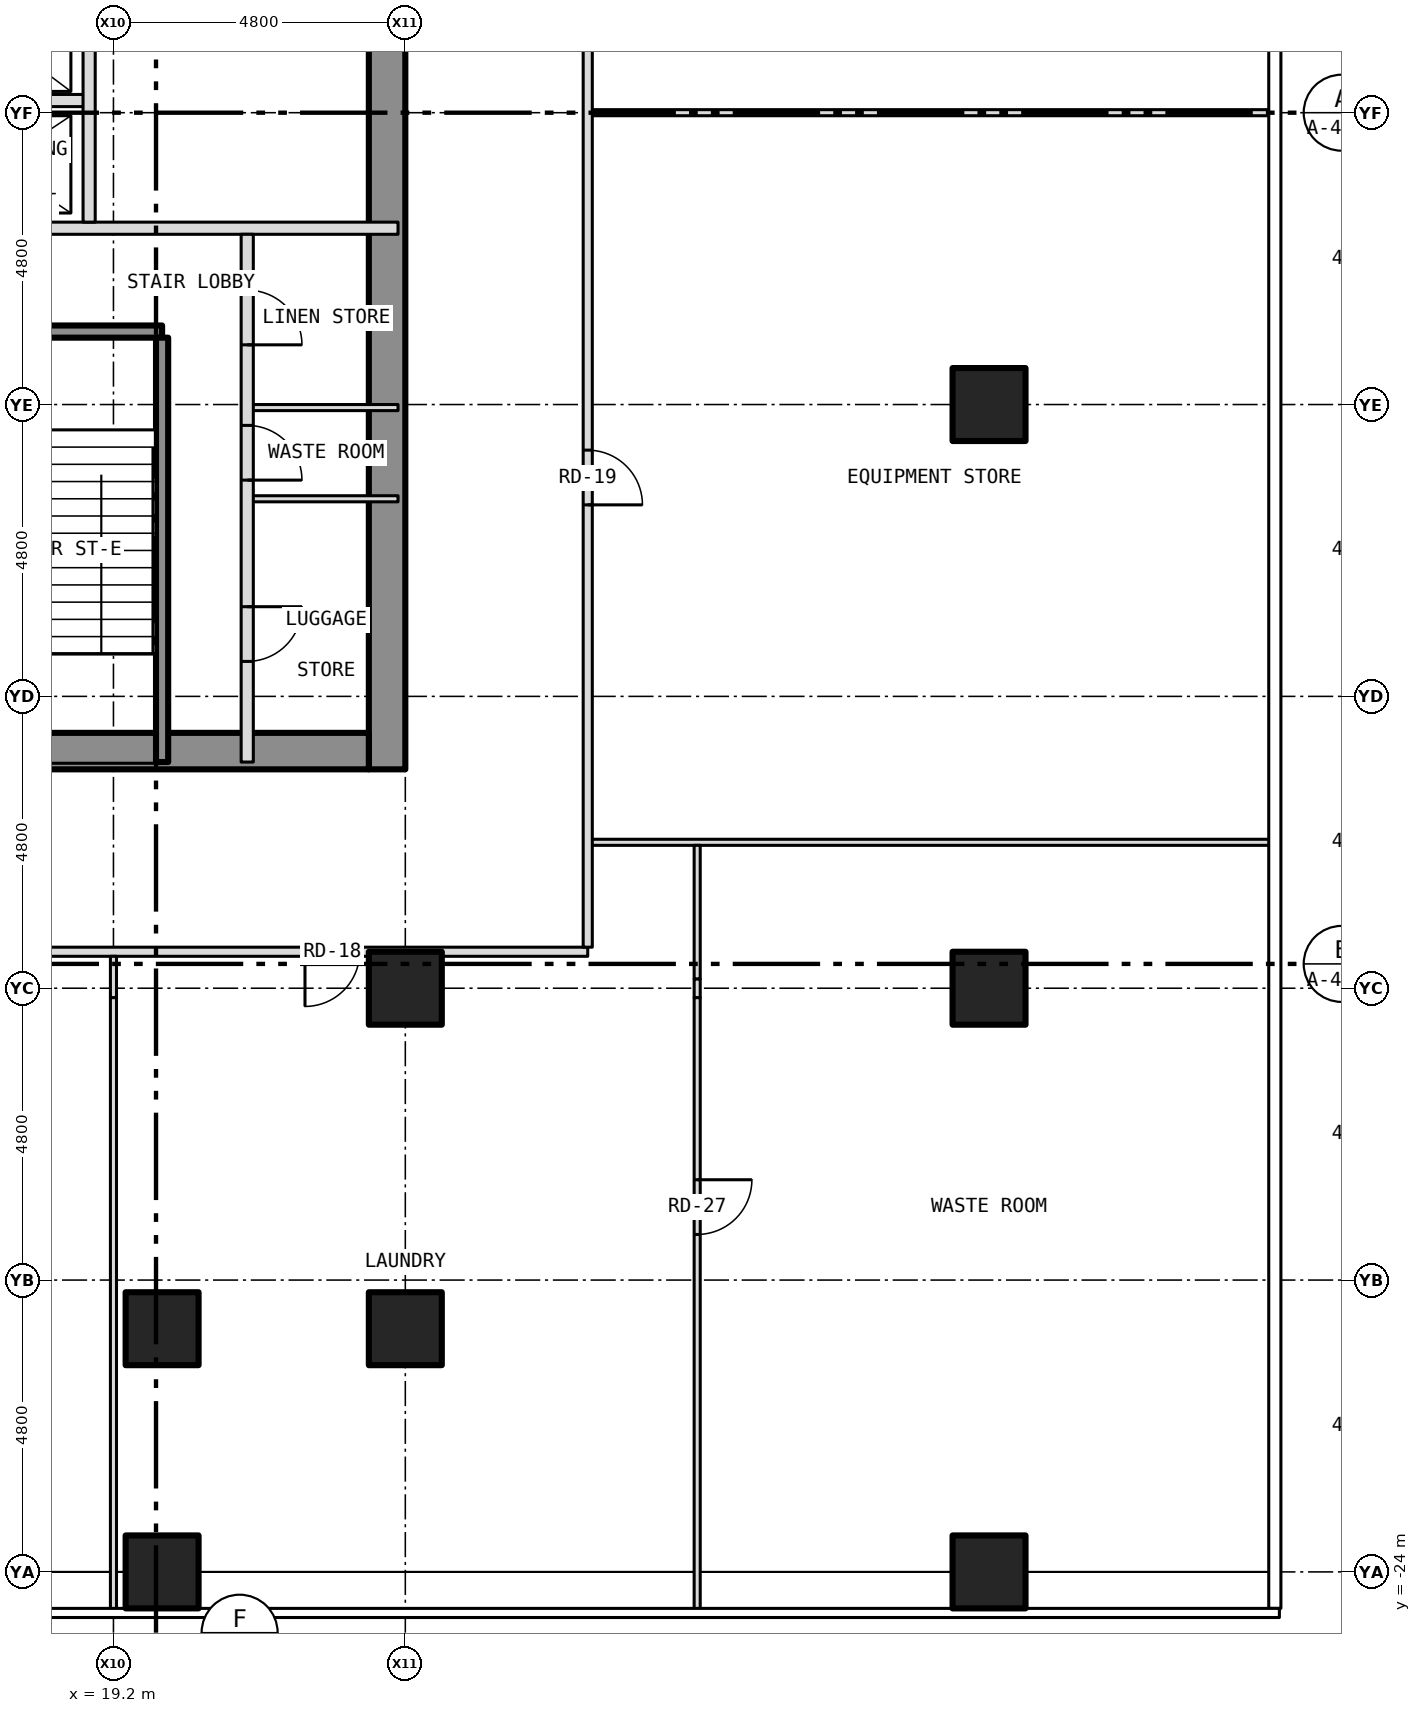
"""IFC4 building model, lengths in metres.
Left out: names, types, materials, properties, quantities, classifications, styles, units other than length and angle.
Written with IfcOpenShell. Run it as: python <this file> out.ifc"""

import sys

from ifc_helpers import new_model, si_unit, direction, frame, frame_2d, origin, origin_2d, place, context, subcontext, project, spatial, rectangle, hollow_rectangle, extrude, element, fill, save


model = new_model("IFC4")
c1 = context("Model", 3, precision=1e-05, world=origin(), true_north=direction((0.0, 1.0)))
c2 = subcontext(c1, "Body", "Model", "MODEL_VIEW")
j1 = project(units=[si_unit("LENGTHUNIT", "METRE"), si_unit("PLANEANGLEUNIT", "RADIAN")], contexts=[c1])
p1 = place(None, origin())
s1 = spatial("IfcSite", under=j1, at=p1, CompositionType="ELEMENT")
p2 = place(p1, origin())
s2 = spatial("IfcBuilding", under=s1, at=p2, CompositionType="ELEMENT")
p3 = place(p2, frame((0.0, 0.0, 24.5)))
s3 = spatial("IfcBuildingStorey", under=s2, at=p3, CompositionType="ELEMENT", Elevation=24.5)
for number, where, z_axis, x_axis in (
    (1, (20.0, -24.0, -0.2), (0.0, 0.0, 1.0), (1.0, 0.0, 0.0)),
    (2, (33.6, -24.0, -0.2), (0.0, 0.0, 1.0), (1.0, 0.0, 0.0)),
    (3, (33.6, -14.4, -0.2), (0.0, 0.0, 1.0), (1.0, 0.0, 0.0)),
    (4, (33.6, -4.8, -0.2), (0.0, 0.0, 1.0), (1.0, 0.0, 0.0)),
    (5, (20.0, -20.0, -0.2), (0.0, 0.0, 1.0), (1.0, 0.0, 0.0)),
    (6, (24.0, -20.0, -0.2), (0.0, 0.0, 1.0), (1.0, 0.0, 0.0)),
    (7, (24.0, -14.4, -0.2), (0.0, 0.0, 1.0), (1.0, 0.0, 0.0)),
):
    element("IfcColumn", number, at=place(p3, frame(where, z_axis=z_axis, x_axis=x_axis)), inside=s3, PredefinedType="COLUMN", context=c2, shape_type="SweptSolid", body=[
        extrude(hollow_rectangle(XDim=1.2, YDim=1.2, WallThickness=0.07, at=origin_2d()), origin(), (0.0, 0.0, 1.0), 4.5),
    ])
p4 = place(p3, frame((23.7, -10.8, 0.0), z_axis=(0.0, 0.0, 1.0), x_axis=(0.0, 1.0, 0.0)))
e8 = element("IfcWall", 8, at=p4, inside=s3, PredefinedType="SHEAR", context=c2, shape_type="SweptSolid", body=[
    extrude(rectangle(XDim=21.6, YDim=0.6, at=frame_2d((10.8, 0.0))), origin(), (0.0, 0.0, 1.0), 4.2),
])
p5 = place(p3, frame((16.4, -10.5, 0.0), z_axis=(0.0, 0.0, 1.0), x_axis=(1.0, 0.0, 0.0)))
e9 = element("IfcWall", 9, at=p5, inside=s3, PredefinedType="SHEAR", context=c2, shape_type="SweptSolid", body=[
    extrude(rectangle(XDim=7.0, YDim=0.6, at=frame_2d((3.5, 0.0))), origin(), (0.0, 0.0, 1.0), 4.2),
])
p6 = place(p3, frame((-27.0, -13.8, 0.0), z_axis=(0.0, 0.0, 1.0), x_axis=(1.0, 0.0, 0.0)))
e10 = element("IfcWall", 10, at=p6, inside=s3, PredefinedType="PARTITIONING", context=c2, shape_type="SweptSolid", body=[
    extrude(rectangle(XDim=54.0, YDim=0.15, at=frame_2d((27.0, 0.0))), origin(), (0.0, 0.0, 1.0), 4.3),
])
p7 = place(p6, frame((37.83, 0.0, 0.0)))
e11 = element("IfcOpeningElement", 11, at=p7, cuts=e10, PredefinedType="OPENING", context=c2, shape_type="SweptSolid", body=[
    extrude(rectangle(XDim=0.9, YDim=2.1, at=frame_2d((0.45, 1.05))), frame((0.0, 0.087, 0.0), z_axis=(0.0, -1.0, 0.0), x_axis=(1.0, 0.0, 0.0)), (0.0, 0.0, 1.0), 0.174),
])
p8 = place(p6, frame((39.88, 0.0, 0.0)))
e12 = element("IfcOpeningElement", 12, at=p8, cuts=e10, PredefinedType="OPENING", context=c2, shape_type="SweptSolid", body=[
    extrude(rectangle(XDim=0.9, YDim=2.1, at=frame_2d((0.45, 1.05))), frame((0.0, 0.087, 0.0), z_axis=(0.0, -1.0, 0.0), x_axis=(1.0, 0.0, 0.0)), (0.0, 0.0, 1.0), 0.174),
])
p9 = place(p6, frame((43.75, 0.0, 0.0)))
e13 = element("IfcOpeningElement", 13, at=p9, cuts=e10, PredefinedType="OPENING", context=c2, shape_type="SweptSolid", body=[
    extrude(rectangle(XDim=0.9, YDim=2.1, at=frame_2d((0.45, 1.05))), frame((0.0, 0.087, 0.0), z_axis=(0.0, -1.0, 0.0), x_axis=(1.0, 0.0, 0.0)), (0.0, 0.0, 1.0), 0.174),
])
p10 = place(p6, frame((10.972, 0.0, 0.0)))
e14 = element("IfcOpeningElement", 14, at=p10, cuts=e10, PredefinedType="OPENING", context=c2, shape_type="SweptSolid", body=[
    extrude(rectangle(XDim=0.9, YDim=2.1, at=frame_2d((0.45, 1.05))), frame((0.0, 0.087, 0.0), z_axis=(0.0, -1.0, 0.0), x_axis=(1.0, 0.0, 0.0)), (0.0, 0.0, 1.0), 0.174),
])
p11 = place(p6, frame((18.523, 0.0, 0.0)))
e15 = element("IfcOpeningElement", 15, at=p11, cuts=e10, PredefinedType="OPENING", context=c2, shape_type="SweptSolid", body=[
    extrude(rectangle(XDim=0.9, YDim=2.1, at=frame_2d((0.45, 1.05))), frame((0.0, 0.087, 0.0), z_axis=(0.0, -1.0, 0.0), x_axis=(1.0, 0.0, 0.0)), (0.0, 0.0, 1.0), 0.174),
])
p12 = place(p6, frame((22.956, 0.0, 0.0)))
e16 = element("IfcOpeningElement", 16, at=p12, cuts=e10, PredefinedType="OPENING", context=c2, shape_type="SweptSolid", body=[
    extrude(rectangle(XDim=0.9, YDim=2.1, at=frame_2d((0.45, 1.05))), frame((0.0, 0.087, 0.0), z_axis=(0.0, -1.0, 0.0), x_axis=(1.0, 0.0, 0.0)), (0.0, 0.0, 1.0), 0.174),
])
p13 = place(p6, frame((25.242, 0.0, 0.0)))
e17 = element("IfcOpeningElement", 17, at=p13, cuts=e10, PredefinedType="OPENING", context=c2, shape_type="SweptSolid", body=[
    extrude(rectangle(XDim=0.9, YDim=2.1, at=frame_2d((0.45, 1.05))), frame((0.0, 0.087, 0.0), z_axis=(0.0, -1.0, 0.0), x_axis=(1.0, 0.0, 0.0)), (0.0, 0.0, 1.0), 0.174),
])
p14 = place(p6, frame((29.45, 0.0, 0.0)))
e18 = element("IfcOpeningElement", 18, at=p14, cuts=e10, PredefinedType="OPENING", context=c2, shape_type="SweptSolid", body=[
    extrude(rectangle(XDim=0.9, YDim=2.1, at=frame_2d((0.45, 1.05))), frame((0.0, 0.087, 0.0), z_axis=(0.0, -1.0, 0.0), x_axis=(1.0, 0.0, 0.0)), (0.0, 0.0, 1.0), 0.174),
])
p15 = place(p6, frame((3.75, 0.0, 0.0)))
e19 = element("IfcOpeningElement", 19, at=p15, cuts=e10, PredefinedType="OPENING", context=c2, shape_type="SweptSolid", body=[
    extrude(rectangle(XDim=0.9, YDim=2.1, at=frame_2d((0.45, 1.05))), frame((0.0, 0.087, 0.0), z_axis=(0.0, -1.0, 0.0), x_axis=(1.0, 0.0, 0.0)), (0.0, 0.0, 1.0), 0.174),
])
p16 = place(p6, frame((49.35, 0.0, 0.0)))
e20 = element("IfcOpeningElement", 20, at=p16, cuts=e10, PredefinedType="OPENING", context=c2, shape_type="SweptSolid", body=[
    extrude(rectangle(XDim=0.9, YDim=2.1, at=frame_2d((0.45, 1.05))), frame((0.0, 0.087, 0.0), z_axis=(0.0, -1.0, 0.0), x_axis=(1.0, 0.0, 0.0)), (0.0, 0.0, 1.0), 0.174),
])
p17 = place(p6, frame((34.25, 0.0, 0.0)))
e21 = element("IfcOpeningElement", 21, at=p17, cuts=e10, PredefinedType="OPENING", context=c2, shape_type="SweptSolid", body=[
    extrude(rectangle(XDim=0.9, YDim=2.1, at=frame_2d((0.45, 1.05))), frame((0.0, 0.087, 0.0), z_axis=(0.0, -1.0, 0.0), x_axis=(1.0, 0.0, 0.0)), (0.0, 0.0, 1.0), 0.174),
])
p18 = place(p3, frame((27.0, -12.0, 0.0), z_axis=(0.0, 0.0, 1.0), x_axis=(1.0, 0.0, 0.0)))
e22 = element("IfcWall", 22, at=p18, inside=s3, PredefinedType="PARTITIONING", context=c2, shape_type="SweptSolid", body=[
    extrude(rectangle(XDim=11.28, YDim=0.1, at=frame_2d((5.64, 0.0))), origin(), (0.0, 0.0, 1.0), 4.3),
])
for number, where, z_axis, x_axis in (
    (23, (21.4, -6.35, 0.0), (0.0, 0.0, 1.0), (1.0, 0.0, 0.0)),
    (24, (21.4, -4.85, 0.0), (0.0, 0.0, 1.0), (1.0, 0.0, 0.0)),
):
    element("IfcWall", number, at=place(p3, frame(where, z_axis=z_axis, x_axis=x_axis)), inside=s3, PredefinedType="PARTITIONING", context=c2, shape_type="SweptSolid", body=[
        extrude(rectangle(XDim=2.48, YDim=0.1, at=frame_2d((1.24, 0.0))), origin(), (0.0, 0.0, 1.0), 4.2),
    ])
p19 = place(p3, frame((15.92, -3.6, 0.0), z_axis=(0.0, 0.0, 1.0), x_axis=(1.0, 0.0, 0.0)))
e25 = element("IfcWall", 25, at=p19, inside=s3, PredefinedType="SHEAR", context=c2, shape_type="SweptSolid", body=[
    extrude(rectangle(XDim=4.08, YDim=0.2, at=frame_2d((2.04, 0.0))), origin(), (0.0, 0.0, 1.0), 4.2),
])
p20 = place(p3, frame((15.92, -1.9, 0.0), z_axis=(0.0, 0.0, 1.0), x_axis=(1.0, 0.0, 0.0)))
e26 = element("IfcWall", 26, at=p20, inside=s3, PredefinedType="PARTITIONING", context=c2, shape_type="SweptSolid", body=[
    extrude(rectangle(XDim=7.96, YDim=0.2, at=frame_2d((3.98, 0.0))), origin(), (0.0, 0.0, 1.0), 4.2),
])
p21 = place(p3, frame((27.0, 0.0, 0.0), z_axis=(0.0, 0.0, 1.0), x_axis=(1.0, 0.0, 0.0)))
e27 = element("IfcWall", 27, at=p21, inside=s3, PredefinedType="PARTITIONING", context=c2, shape_type="SweptSolid", body=[
    extrude(rectangle(XDim=11.28, YDim=0.1, at=frame_2d((5.64, 0.0))), origin(), (0.0, 0.0, 1.0), 4.3),
])
p22 = place(p3, frame((15.92, 0.2, 0.0), z_axis=(0.0, 0.0, 1.0), x_axis=(1.0, 0.0, 0.0)))
e28 = element("IfcWall", 28, at=p22, inside=s3, PredefinedType="PARTITIONING", context=c2, shape_type="SweptSolid", body=[
    extrude(rectangle(XDim=2.88, YDim=0.2, at=frame_2d((1.44, 0.0))), origin(), (0.0, 0.0, 1.0), 4.2),
])
p23 = place(p3, frame((18.8, -1.8, 0.0), z_axis=(0.0, 0.0, 1.0), x_axis=(0.0, 1.0, 0.0)))
e29 = element("IfcWall", 29, at=p23, inside=s3, PredefinedType="PARTITIONING", context=c2, shape_type="SweptSolid", body=[
    extrude(rectangle(XDim=12.48, YDim=0.2, at=frame_2d((6.24, 0.0))), origin(), (0.0, 0.0, 1.0), 4.2),
])
p24 = place(p3, frame((19.2, -24.63, 0.0), z_axis=(0.0, 0.0, 1.0), x_axis=(0.0, 1.0, 0.0)))
e30 = element("IfcWall", 30, at=p24, inside=s3, PredefinedType="PARTITIONING", context=c2, shape_type="SweptSolid", body=[
    extrude(rectangle(XDim=10.076, YDim=0.1, at=frame_2d((5.038, 0.0))), origin(), (0.0, 0.0, 1.0), 3.683),
])
p25 = place(p3, frame((19.2, -14.554, 0.0), z_axis=(0.0, 0.0, 1.0), x_axis=(0.0, 1.0, 0.0)))
e31 = element("IfcWall", 31, at=p25, inside=s3, PredefinedType="PARTITIONING", context=c2, shape_type="SweptSolid", body=[
    extrude(rectangle(XDim=0.679, YDim=0.1, at=frame_2d((0.339, 0.0))), origin(), (0.0, 0.0, 1.0), 4.3),
])
p26 = place(p3, frame((20.0, -10.68, 0.0), z_axis=(0.0, 0.0, 1.0), x_axis=(0.0, 1.0, 0.0)))
e32 = element("IfcWall", 32, at=p26, inside=s3, PredefinedType="SHEAR", context=c2, shape_type="SweptSolid", body=[
    extrude(rectangle(XDim=6.98, YDim=0.2, at=frame_2d((3.49, 0.0))), origin(), (0.0, 0.0, 1.0), 4.2),
])
p27 = place(p3, frame((21.4, -10.68, 0.0), z_axis=(0.0, 0.0, 1.0), x_axis=(0.0, 1.0, 0.0)))
e33 = element("IfcWall", 33, at=p27, inside=s3, PredefinedType="PARTITIONING", context=c2, shape_type="SweptSolid", body=[
    extrude(rectangle(XDim=8.68, YDim=0.2, at=frame_2d((4.34, 0.0))), origin(), (0.0, 0.0, 1.0), 4.2),
])
p28 = place(p27, frame((1.655, 0.0, 0.0)))
e34 = element("IfcOpeningElement", 34, at=p28, cuts=e33, PredefinedType="OPENING", context=c2, shape_type="SweptSolid", body=[
    extrude(rectangle(XDim=0.9, YDim=2.1, at=frame_2d((0.45, 1.05))), frame((0.0, 0.112, 0.0), z_axis=(0.0, -1.0, 0.0), x_axis=(1.0, 0.0, 0.0)), (0.0, 0.0, 1.0), 0.224),
])
p29 = place(p27, frame((4.637, 0.0, 0.0)))
e35 = element("IfcOpeningElement", 35, at=p29, cuts=e33, PredefinedType="OPENING", context=c2, shape_type="SweptSolid", body=[
    extrude(rectangle(XDim=0.9, YDim=2.1, at=frame_2d((0.45, 1.05))), frame((0.0, 0.112, 0.0), z_axis=(0.0, -1.0, 0.0), x_axis=(1.0, 0.0, 0.0)), (0.0, 0.0, 1.0), 0.224),
])
p30 = place(p27, frame((6.862, 0.0, 0.0)))
e36 = element("IfcOpeningElement", 36, at=p30, cuts=e33, PredefinedType="OPENING", context=c2, shape_type="SweptSolid", body=[
    extrude(rectangle(XDim=0.9, YDim=2.1, at=frame_2d((0.45, 1.05))), frame((0.0, 0.112, 0.0), z_axis=(0.0, -1.0, 0.0), x_axis=(1.0, 0.0, 0.0)), (0.0, 0.0, 1.0), 0.224),
])
p31 = place(p3, frame((27.0, -13.725, 0.0), z_axis=(0.0, 0.0, 1.0), x_axis=(0.0, 1.0, 0.0)))
e37 = element("IfcWall", 37, at=p31, inside=s3, PredefinedType="PARTITIONING", context=c2, shape_type="SweptSolid", body=[
    extrude(rectangle(XDim=27.45, YDim=0.15, at=frame_2d((13.725, 0.0))), origin(), (0.0, 0.0, 1.0), 4.3),
])
p32 = place(p31, frame((7.275, 0.0, 0.0)))
e38 = element("IfcOpeningElement", 38, at=p32, cuts=e37, PredefinedType="OPENING", context=c2, shape_type="SweptSolid", body=[
    extrude(rectangle(XDim=0.9, YDim=2.1, at=frame_2d((0.45, 1.05))), frame((0.0, 0.087, 0.0), z_axis=(0.0, -1.0, 0.0), x_axis=(1.0, 0.0, 0.0)), (0.0, 0.0, 1.0), 0.174),
])
p33 = place(p31, frame((19.275, 0.0, 0.0)))
e39 = element("IfcOpeningElement", 39, at=p33, cuts=e37, PredefinedType="OPENING", context=c2, shape_type="SweptSolid", body=[
    extrude(rectangle(XDim=0.9, YDim=2.1, at=frame_2d((0.45, 1.05))), frame((0.0, 0.087, 0.0), z_axis=(0.0, -1.0, 0.0), x_axis=(1.0, 0.0, 0.0)), (0.0, 0.0, 1.0), 0.174),
])
p34 = place(p3, frame((28.8, -24.63, 0.0), z_axis=(0.0, 0.0, 1.0), x_axis=(0.0, 1.0, 0.0)))
e40 = element("IfcWall", 40, at=p34, inside=s3, PredefinedType="PARTITIONING", context=c2, shape_type="SweptSolid", body=[
    extrude(rectangle(XDim=10.076, YDim=0.1, at=frame_2d((5.038, 0.0))), origin(), (0.0, 0.0, 1.0), 3.683),
])
p35 = place(p34, frame((6.18, 0.0, 0.0)))
e41 = element("IfcOpeningElement", 41, at=p35, cuts=e40, PredefinedType="OPENING", context=c2, shape_type="SweptSolid", body=[
    extrude(rectangle(XDim=0.9, YDim=2.1, at=frame_2d((0.45, 1.05))), frame((0.0, 0.062, 0.0), z_axis=(0.0, -1.0, 0.0), x_axis=(1.0, 0.0, 0.0)), (0.0, 0.0, 1.0), 0.124),
])
p36 = place(p3, frame((28.8, -14.554, 0.0), z_axis=(0.0, 0.0, 1.0), x_axis=(0.0, 1.0, 0.0)))
e42 = element("IfcWall", 42, at=p36, inside=s3, PredefinedType="PARTITIONING", context=c2, shape_type="SweptSolid", body=[
    extrude(rectangle(XDim=0.308, YDim=0.1, at=frame_2d((0.154, 0.0))), origin(), (0.0, 0.0, 1.0), 4.3),
])
p37 = place(p3, frame((28.8, -14.246, 0.0), z_axis=(0.0, 0.0, 1.0), x_axis=(0.0, 1.0, 0.0)))
e43 = element("IfcWall", 43, at=p37, inside=s3, PredefinedType="PARTITIONING", context=c2, shape_type="SweptSolid", body=[
    extrude(rectangle(XDim=2.196, YDim=0.1, at=frame_2d((1.098, 0.0))), origin(), (0.0, 0.0, 1.0), 3.683),
])
p38 = place(p28, origin())
e44 = element("IfcDoor", 44, at=p38, inside=s3, OperationType="SINGLE_SWING_RIGHT", PredefinedType="DOOR", context=c2, shape_type="SweptSolid", body=[
    extrude(rectangle(XDim=0.9, YDim=2.1, at=frame_2d((0.45, 1.05))), frame((0.0, 0.025, 0.0), z_axis=(0.0, -1.0, 0.0), x_axis=(1.0, 0.0, 0.0)), (0.0, 0.0, 1.0), 0.05),
])
fill(e34, e44)
p39 = place(p29, origin())
e45 = element("IfcDoor", 45, at=p39, inside=s3, OperationType="SINGLE_SWING_LEFT", PredefinedType="DOOR", context=c2, shape_type="SweptSolid", body=[
    extrude(rectangle(XDim=0.9, YDim=2.1, at=frame_2d((0.45, 1.05))), frame((0.0, 0.025, 0.0), z_axis=(0.0, -1.0, 0.0), x_axis=(1.0, 0.0, 0.0)), (0.0, 0.0, 1.0), 0.05),
])
fill(e35, e45)
p40 = place(p30, origin())
e46 = element("IfcDoor", 46, at=p40, inside=s3, OperationType="SINGLE_SWING_LEFT", PredefinedType="DOOR", context=c2, shape_type="SweptSolid", body=[
    extrude(rectangle(XDim=0.9, YDim=2.1, at=frame_2d((0.45, 1.05))), frame((0.0, 0.025, 0.0), z_axis=(0.0, -1.0, 0.0), x_axis=(1.0, 0.0, 0.0)), (0.0, 0.0, 1.0), 0.05),
])
fill(e36, e46)
p41 = place(p16, origin())
e47 = element("IfcDoor", 47, at=p41, inside=s3, OperationType="SINGLE_SWING_LEFT", PredefinedType="DOOR", context=c2, shape_type="SweptSolid", body=[
    extrude(rectangle(XDim=0.9, YDim=2.1, at=frame_2d((0.45, 1.05))), frame((0.0, 0.025, 0.0), z_axis=(0.0, -1.0, 0.0), x_axis=(1.0, 0.0, 0.0)), (0.0, 0.0, 1.0), 0.05),
])
fill(e20, e47)
p42 = place(p32, origin())
e48 = element("IfcDoor", 48, at=p42, inside=s3, OperationType="SINGLE_SWING_LEFT", PredefinedType="DOOR", context=c2, shape_type="SweptSolid", body=[
    extrude(rectangle(XDim=0.9, YDim=2.1, at=frame_2d((0.45, 1.05))), frame((0.0, 0.025, 0.0), z_axis=(0.0, -1.0, 0.0), x_axis=(1.0, 0.0, 0.0)), (0.0, 0.0, 1.0), 0.05),
])
fill(e38, e48)
p43 = place(p35, origin())
e49 = element("IfcDoor", 49, at=p43, inside=s3, OperationType="SINGLE_SWING_RIGHT", PredefinedType="DOOR", context=c2, shape_type="SweptSolid", body=[
    extrude(rectangle(XDim=0.9, YDim=2.1, at=frame_2d((0.45, 1.05))), frame((0.0, 0.025, 0.0), z_axis=(0.0, -1.0, 0.0), x_axis=(1.0, 0.0, 0.0)), (0.0, 0.0, 1.0), 0.05),
])
fill(e41, e49)
save(model, sys.argv[1])
